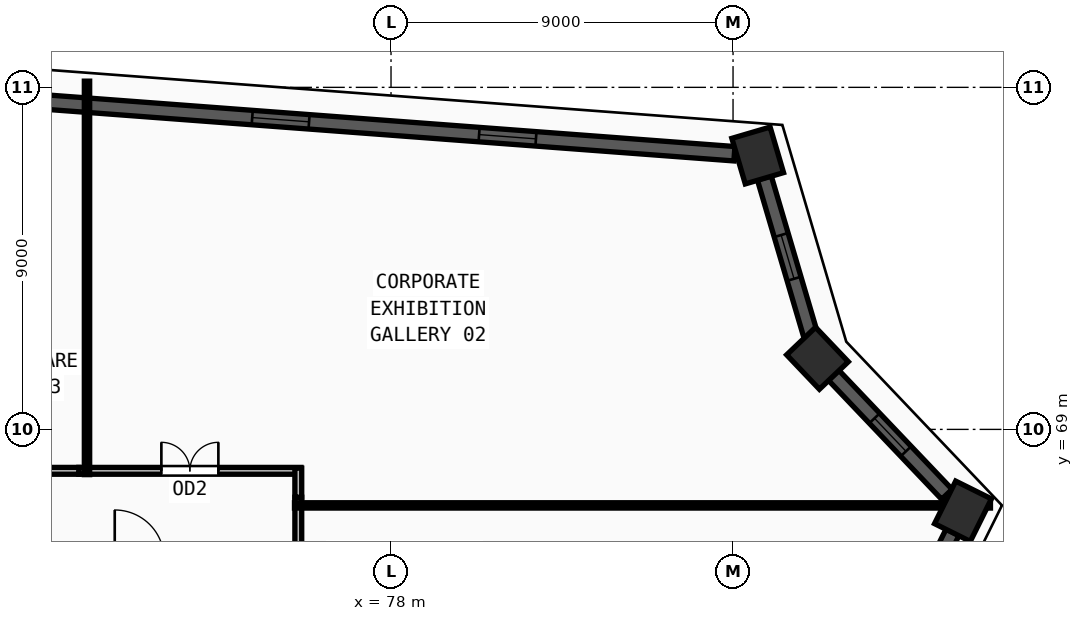
"""IFC4 building model, lengths in metres.
Left out: names, types, materials, properties, quantities, classifications, styles, units other than length and angle.
Written with IfcOpenShell. Run it as: python <this file> out.ifc"""

import sys

from ifc_helpers import new_model, si_unit, direction, frame, frame_2d, origin, origin_2d, place, context, subcontext, project, spatial, rectangle, extrude, source, transform, mapped, element, fill, save


model = new_model("IFC4")
c1 = context("Model", 3, precision=1e-05, world=origin(), true_north=direction((0.0, 1.0)))
c2 = subcontext(c1, "Body", "Model", "MODEL_VIEW")
j1 = project(units=[si_unit("LENGTHUNIT", "METRE"), si_unit("PLANEANGLEUNIT", "RADIAN")], contexts=[c1])
p1 = place(None, origin())
s1 = spatial("IfcSite", under=j1, at=p1, CompositionType="ELEMENT")
p2 = place(p1, origin())
s2 = spatial("IfcBuilding", under=s1, at=p2, CompositionType="ELEMENT")
p3 = place(p2, frame((0.0, 0.0, 224.25)))
s3 = spatial("IfcBuildingStorey", under=s2, at=p3, CompositionType="ELEMENT", Elevation=224.25)
m1 = source(origin(), c2, "Body", "SweptSolid", [
    extrude(rectangle(XDim=1.25, YDim=1.05, at=origin_2d()), origin(), (0.0, 0.0, 1.0), 3.75),
])
for number, where, z_axis, x_axis in (
    (1, (87.649, 76.207, 0.0), (0.0, 0.0, 1.0), (-0.283, 0.959, 0.0)),
    (2, (89.222, 70.871, 0.0), (0.0, 0.0, 1.0), (-0.689, 0.724, 0.0)),
    (3, (93.051, 66.846, 0.0), (0.0, 0.0, 1.0), (0.445, 0.896, 0.0)),
):
    element("IfcColumn", number, at=place(p3, frame(where, z_axis=z_axis, x_axis=x_axis)), inside=s3, PredefinedType="COLUMN", context=c2, shape_type="MappedRepresentation", body=[
        mapped(m1, transform((0.0, 0.0, 0.0), x_axis=(1.0, 0.0, 0.0), y_axis=(0.0, 1.0, 0.0), z_axis=(0.0, 0.0, 1.0), scale=1.0)),
    ])
p4 = place(p3, frame((79.867, 40.305, 0.0), z_axis=(0.0, 0.0, 1.0), x_axis=(0.444873284972, 0.895593524049, 0.0)))
e4 = element("IfcWall", 4, at=p4, inside=s3, PredefinedType="SOLIDWALL", context=c2, shape_type="SweptSolid", body=[
    extrude(rectangle(XDim=29.02, YDim=0.38, at=frame_2d((14.51, 0.0))), origin(), (0.0, 0.0, 1.0), 3.57),
])
m2 = source(origin(), c2, "Body", "SweptSolid", [
    extrude(rectangle(XDim=1.5, YDim=1.9, at=frame_2d((0.75, 0.95))), frame((0.0, 0.2, 0.0), z_axis=(0.0, -1.0, 0.0), x_axis=(1.0, 0.0, 0.0)), (0.0, 0.0, 1.0), 0.4),
])
p5 = place(p4, frame((6.505, 0.0, 0.55)))
e5 = element("IfcOpeningElement", 5, at=p5, cuts=e4, PredefinedType="OPENING", context=c2, shape_type="MappedRepresentation", body=[
    mapped(m2, transform((0.0, 0.0, 0.0), x_axis=(1.0, 0.0, 0.0), y_axis=(0.0, 1.0, 0.0), z_axis=(0.0, 0.0, 1.0), scale=1.0)),
])
p6 = place(p4, frame((13.76, 0.0, 0.55)))
e6 = element("IfcOpeningElement", 6, at=p6, cuts=e4, PredefinedType="OPENING", context=c2, shape_type="MappedRepresentation", body=[
    mapped(m2, transform((0.0, 0.0, 0.0), x_axis=(1.0, 0.0, 0.0), y_axis=(0.0, 1.0, 0.0), z_axis=(0.0, 0.0, 1.0), scale=1.0)),
])
p7 = place(p4, frame((21.015, 0.0, 0.55)))
e7 = element("IfcOpeningElement", 7, at=p7, cuts=e4, PredefinedType="OPENING", context=c2, shape_type="MappedRepresentation", body=[
    mapped(m2, transform((0.0, 0.0, 0.0), x_axis=(1.0, 0.0, 0.0), y_axis=(0.0, 1.0, 0.0), z_axis=(0.0, 0.0, 1.0), scale=1.0)),
])
p8 = place(p3, frame((92.627, 67.292, 0.0), z_axis=(0.0, 0.0, 1.0), x_axis=(-0.689302673128, 0.724473481101, 0.0)))
e8 = element("IfcWall", 8, at=p8, inside=s3, PredefinedType="SOLIDWALL", context=c2, shape_type="SweptSolid", body=[
    extrude(rectangle(XDim=4.325, YDim=0.38, at=frame_2d((2.162, 0.0))), origin(), (0.0, 0.0, 1.0), 3.57),
])
m3 = source(origin(), c2, "Body", "SweptSolid", [
    extrude(rectangle(XDim=1.2, YDim=1.9, at=frame_2d((0.6, 0.95))), frame((0.0, 0.2, 0.0), z_axis=(0.0, -1.0, 0.0), x_axis=(1.0, 0.0, 0.0)), (0.0, 0.0, 1.0), 0.4),
])
p9 = place(p8, frame((1.562, 0.0, 0.55)))
e9 = element("IfcOpeningElement", 9, at=p9, cuts=e8, PredefinedType="OPENING", context=c2, shape_type="MappedRepresentation", body=[
    mapped(m3, transform((0.0, 0.0, 0.0), x_axis=(1.0, 0.0, 0.0), y_axis=(0.0, 1.0, 0.0), z_axis=(0.0, 0.0, 1.0), scale=1.0)),
])
p10 = place(p3, frame((89.048, 71.461, 0.0), z_axis=(0.0, 0.0, 1.0), x_axis=(-0.282748942372, 0.959193950975, 0.0)))
e10 = element("IfcWall", 10, at=p10, inside=s3, PredefinedType="SOLIDWALL", context=c2, shape_type="SweptSolid", body=[
    extrude(rectangle(XDim=4.333, YDim=0.38, at=frame_2d((2.167, 0.0))), origin(), (0.0, 0.0, 1.0), 3.57),
])
p11 = place(p10, frame((1.566, 0.0, 0.55)))
e11 = element("IfcOpeningElement", 11, at=p11, cuts=e10, PredefinedType="OPENING", context=c2, shape_type="MappedRepresentation", body=[
    mapped(m3, transform((0.0, 0.0, 0.0), x_axis=(1.0, 0.0, 0.0), y_axis=(0.0, 1.0, 0.0), z_axis=(0.0, 0.0, 1.0), scale=1.0)),
])
p12 = place(p3, frame((87.036, 76.253, 0.0), z_axis=(0.0, 0.0, 1.0), x_axis=(-0.997196419931, 0.07482847103, 0.0)))
e12 = element("IfcWall", 12, at=p12, inside=s3, PredefinedType="SOLIDWALL", context=c2, shape_type="SweptSolid", body=[
    extrude(rectangle(XDim=23.948, YDim=0.38, at=frame_2d((11.974, 0.0))), origin(), (0.0, 0.0, 1.0), 3.57),
])
p13 = place(p12, frame((5.237, 0.0, 0.55)))
e13 = element("IfcOpeningElement", 13, at=p13, cuts=e12, PredefinedType="OPENING", context=c2, shape_type="MappedRepresentation", body=[
    mapped(m2, transform((0.0, 0.0, 0.0), x_axis=(1.0, 0.0, 0.0), y_axis=(0.0, 1.0, 0.0), z_axis=(0.0, 0.0, 1.0), scale=1.0)),
])
p14 = place(p12, frame((11.224, 0.0, 0.55)))
e14 = element("IfcOpeningElement", 14, at=p14, cuts=e12, PredefinedType="OPENING", context=c2, shape_type="MappedRepresentation", body=[
    mapped(m2, transform((0.0, 0.0, 0.0), x_axis=(1.0, 0.0, 0.0), y_axis=(0.0, 1.0, 0.0), z_axis=(0.0, 0.0, 1.0), scale=1.0)),
])
p15 = place(p12, frame((18.061, 0.0, 0.55)))
e15 = element("IfcOpeningElement", 15, at=p15, cuts=e12, PredefinedType="OPENING", context=c2, shape_type="MappedRepresentation", body=[
    mapped(m2, transform((0.0, 0.0, 0.0), x_axis=(1.0, 0.0, 0.0), y_axis=(0.0, 1.0, 0.0), z_axis=(0.0, 0.0, 1.0), scale=1.0)),
])
p16 = place(p3, frame((69.785, 67.91, 0.0), z_axis=(0.0, 0.0, 1.0), x_axis=(1.0, 0.0, 0.0)))
e16 = element("IfcWall", 16, at=p16, inside=s3, PredefinedType="PARTITIONING", context=c2, shape_type="SweptSolid", body=[
    extrude(rectangle(XDim=5.845, YDim=0.18, at=frame_2d((2.922, 0.0))), origin(), (0.0, 0.0, 1.0), 3.57),
])
m4 = source(origin(), c2, "Body", "SweptSolid", [
    extrude(rectangle(XDim=1.5, YDim=2.2, at=frame_2d((0.75, 1.1))), frame((0.0, 0.1, 0.0), z_axis=(0.0, -1.0, 0.0), x_axis=(1.0, 0.0, 0.0)), (0.0, 0.0, 1.0), 0.2),
])
p17 = place(p16, frame((2.172, 0.0, 0.0)))
e17 = element("IfcOpeningElement", 17, at=p17, cuts=e16, PredefinedType="OPENING", context=c2, shape_type="MappedRepresentation", body=[
    mapped(m4, transform((0.0, 0.0, 0.0), x_axis=(1.0, 0.0, 0.0), y_axis=(0.0, 1.0, 0.0), z_axis=(0.0, 0.0, 1.0), scale=1.0)),
])
p18 = place(p3, frame((75.56, 67.215, 0.0), z_axis=(0.0, 0.0, 1.0), x_axis=(0.0, -1.0, 0.0)))
e18 = element("IfcWall", 18, at=p18, inside=s3, PredefinedType="PARTITIONING", context=c2, shape_type="SweptSolid", body=[
    extrude(rectangle(XDim=2.235, YDim=0.18, at=frame_2d((1.118, 0.0))), origin(), (0.0, 0.0, 1.0), 3.57),
])
p19 = place(p3, frame((75.56, 67.98, 0.0), z_axis=(0.0, 0.0, 1.0), x_axis=(0.0, -1.0, 0.0)))
e19 = element("IfcWall", 19, at=p19, inside=s3, PredefinedType="PARTITIONING", context=c2, shape_type="SweptSolid", body=[
    extrude(rectangle(XDim=0.765, YDim=0.18, at=frame_2d((0.382, 0.0))), origin(), (0.0, 0.0, 1.0), 3.57),
])
p20 = place(p3, frame((65.39, 67.91, 0.0), z_axis=(0.0, 0.0, 1.0), x_axis=(1.0, 0.0, 0.0)))
e20 = element("IfcWall", 20, at=p20, inside=s3, PredefinedType="PARTITIONING", context=c2, shape_type="SweptSolid", body=[
    extrude(rectangle(XDim=4.395, YDim=0.18, at=frame_2d((2.198, 0.0))), origin(), (0.0, 0.0, 1.0), 3.57),
])
p21 = place(p3, frame((75.46, 67.0, 0.0), z_axis=(0.0, 0.0, 1.0), x_axis=(1.0, 0.0, 0.0)))
e21 = element("IfcWall", 21, at=p21, inside=s3, PredefinedType="PARTITIONING", context=c2, shape_type="SweptSolid", body=[
    extrude(rectangle(XDim=18.314, YDim=0.14, at=frame_2d((9.157, 0.0))), origin(), (0.0, 0.0, 1.0), 3.57),
])
p22 = place(p3, frame((70.0, 67.81, 0.0), z_axis=(0.0, 0.0, 1.0), x_axis=(0.0, 1.0, 0.0)))
e22 = element("IfcWall", 22, at=p22, inside=s3, PredefinedType="PARTITIONING", context=c2, shape_type="SweptSolid", body=[
    extrude(rectangle(XDim=10.353, YDim=0.14, at=frame_2d((5.177, 0.0))), origin(), (0.0, 0.0, 1.0), 3.57),
])
m5 = source(origin(), c2, "Body", "SweptSolid", [
    extrude(rectangle(XDim=1.2, YDim=1.9, at=frame_2d((0.6, 0.95))), frame((0.0, 0.03, 0.0), z_axis=(0.0, -1.0, 0.0), x_axis=(1.0, 0.0, 0.0)), (0.0, 0.0, 1.0), 0.06),
])
p23 = place(p9, origin())
e23 = element("IfcWindow", 23, at=p23, inside=s3, PartitioningType="SINGLE_PANEL", PredefinedType="WINDOW", context=c2, shape_type="MappedRepresentation", body=[
    mapped(m5, transform((0.0, 0.0, 0.0), x_axis=(1.0, 0.0, 0.0), y_axis=(0.0, 1.0, 0.0), z_axis=(0.0, 0.0, 1.0), scale=1.0)),
])
fill(e9, e23)
p24 = place(p11, origin())
e24 = element("IfcWindow", 24, at=p24, inside=s3, PartitioningType="SINGLE_PANEL", PredefinedType="WINDOW", context=c2, shape_type="MappedRepresentation", body=[
    mapped(m5, transform((0.0, 0.0, 0.0), x_axis=(1.0, 0.0, 0.0), y_axis=(0.0, 1.0, 0.0), z_axis=(0.0, 0.0, 1.0), scale=1.0)),
])
fill(e11, e24)
m6 = source(origin(), c2, "Body", "SweptSolid", [
    extrude(rectangle(XDim=1.5, YDim=1.9, at=frame_2d((0.75, 0.95))), frame((0.0, 0.03, 0.0), z_axis=(0.0, -1.0, 0.0), x_axis=(1.0, 0.0, 0.0)), (0.0, 0.0, 1.0), 0.06),
])
p25 = place(p13, origin())
e25 = element("IfcWindow", 25, at=p25, inside=s3, PartitioningType="DOUBLE_PANEL_VERTICAL", PredefinedType="WINDOW", context=c2, shape_type="MappedRepresentation", body=[
    mapped(m6, transform((0.0, 0.0, 0.0), x_axis=(1.0, 0.0, 0.0), y_axis=(0.0, 1.0, 0.0), z_axis=(0.0, 0.0, 1.0), scale=1.0)),
])
fill(e13, e25)
p26 = place(p14, origin())
e26 = element("IfcWindow", 26, at=p26, inside=s3, PartitioningType="DOUBLE_PANEL_VERTICAL", PredefinedType="WINDOW", context=c2, shape_type="MappedRepresentation", body=[
    mapped(m6, transform((0.0, 0.0, 0.0), x_axis=(1.0, 0.0, 0.0), y_axis=(0.0, 1.0, 0.0), z_axis=(0.0, 0.0, 1.0), scale=1.0)),
])
fill(e14, e26)
m7 = source(origin(), c2, "Body", "SweptSolid", [
    extrude(rectangle(XDim=1.5, YDim=2.2, at=frame_2d((0.75, 1.1))), frame((0.0, 0.025, 0.0), z_axis=(0.0, -1.0, 0.0), x_axis=(1.0, 0.0, 0.0)), (0.0, 0.0, 1.0), 0.05),
])
p27 = place(p17, origin())
e27 = element("IfcDoor", 27, at=p27, inside=s3, OperationType="DOUBLE_DOOR_SINGLE_SWING", PredefinedType="DOOR", context=c2, shape_type="MappedRepresentation", body=[
    mapped(m7, transform((0.0, 0.0, 0.0), x_axis=(1.0, 0.0, 0.0), y_axis=(0.0, 1.0, 0.0), z_axis=(0.0, 0.0, 1.0), scale=1.0)),
])
fill(e17, e27)
save(model, sys.argv[1])
